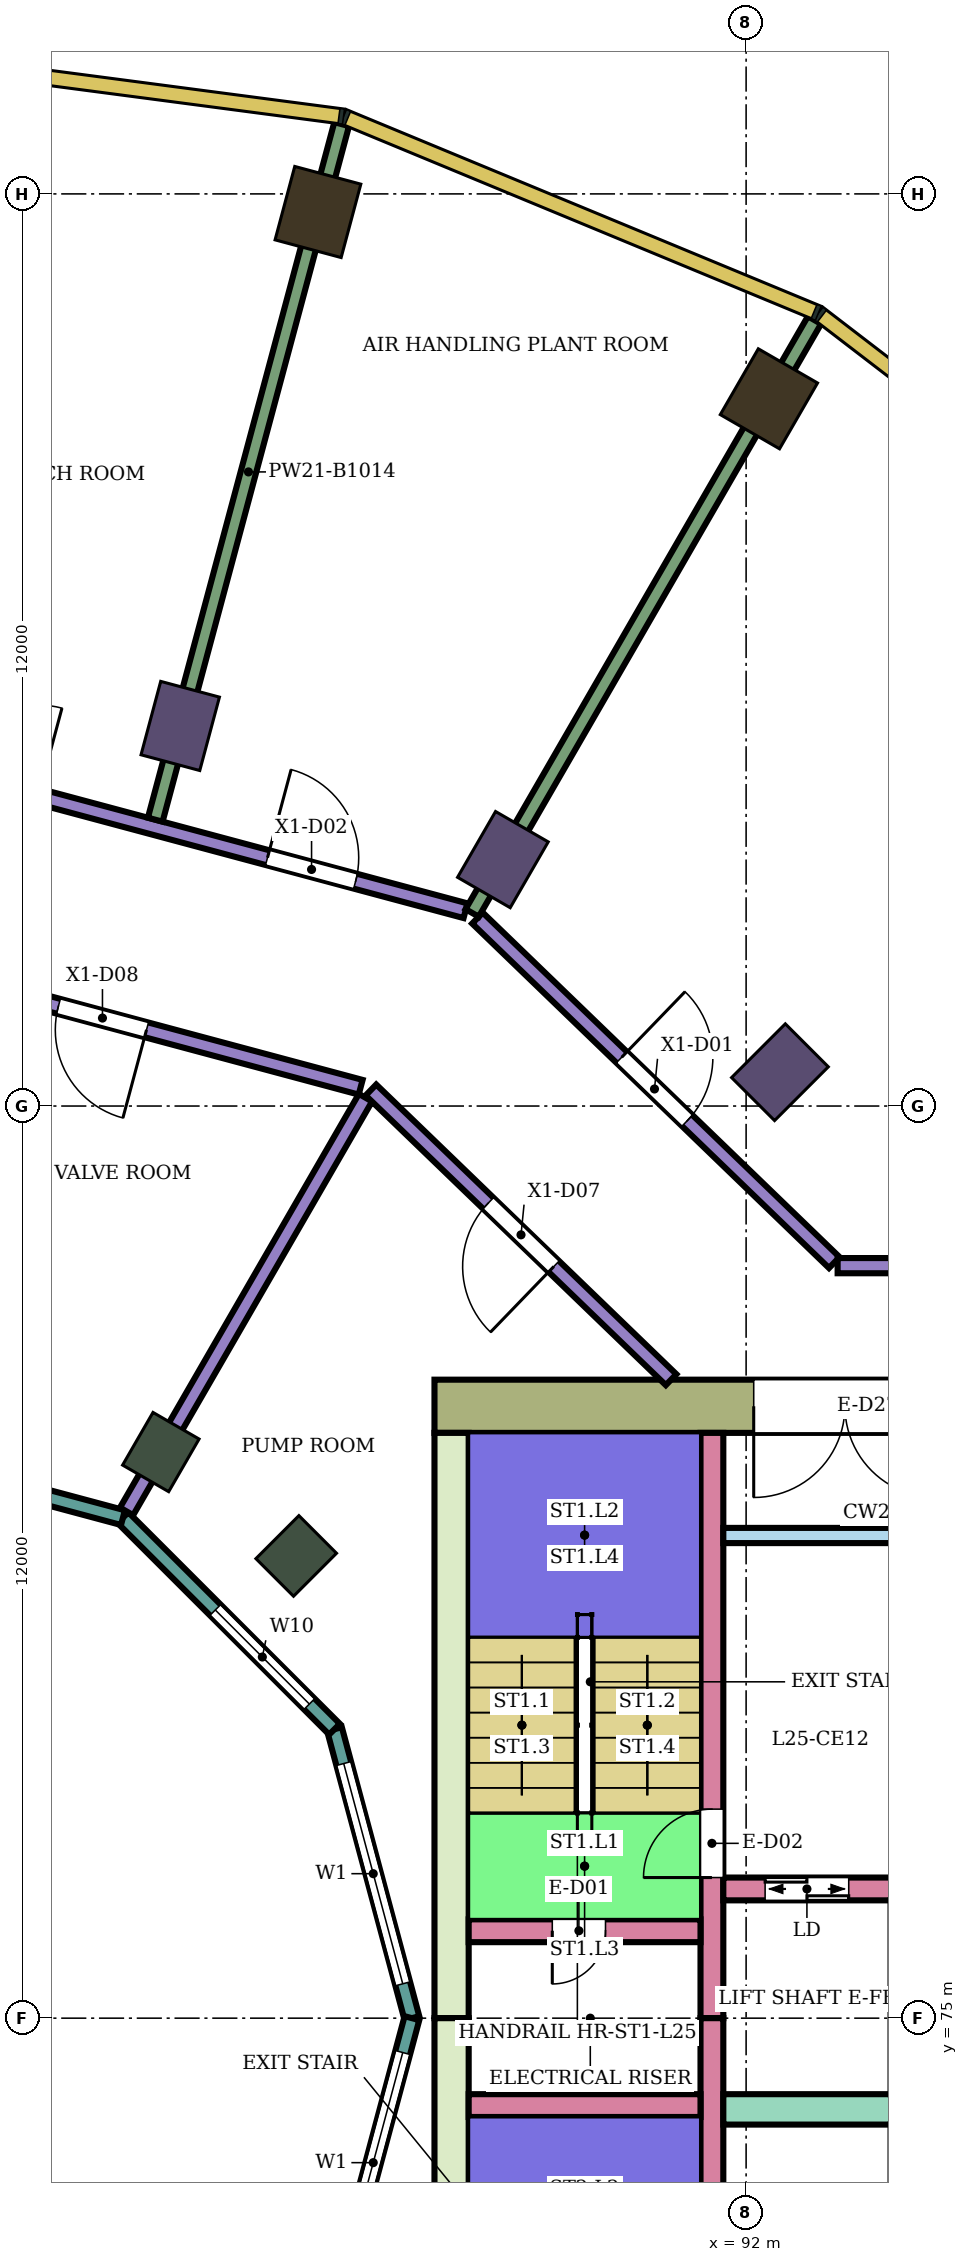
"""IFC4 building model, lengths in metres.
Left out: names, types, materials, properties, quantities, classifications, styles, units other than length and angle.
Written with IfcOpenShell. Run it as: python <this file> out.ifc"""

import sys

from ifc_helpers import new_model, si_unit, direction, frame, frame_2d, origin, origin_2d, place, context, subcontext, project, spatial, rectangle, extrude, element, fill, save


model = new_model("IFC4")
c1 = context("Model", 3, precision=1e-05, world=origin(), true_north=direction((0.0, 1.0)))
c2 = subcontext(c1, "Body", "Model", "MODEL_VIEW")
j1 = project(units=[si_unit("LENGTHUNIT", "METRE"), si_unit("PLANEANGLEUNIT", "RADIAN")], contexts=[c1])
p1 = place(None, origin())
s1 = spatial("IfcSite", under=j1, at=p1, CompositionType="ELEMENT")
p2 = place(p1, origin())
s2 = spatial("IfcBuilding", under=s1, at=p2, CompositionType="ELEMENT")
p3 = place(p2, frame((0.0, 0.0, 109.0)))
s3 = spatial("IfcBuildingStorey", under=s2, at=p3, CompositionType="ELEMENT", Elevation=109.0)
for number, where, z_axis, x_axis in (
    (1, (92.3, 96.304, 0.0), (0.0, 0.0, 1.0), (0.5, 0.866, 0.0)),
    (2, (86.367, 98.762, 0.0), (0.0, 0.0, 1.0), (0.259, 0.966, 0.0)),
):
    element("IfcColumn", number, at=place(p3, frame(where, z_axis=z_axis, x_axis=x_axis)), inside=s3, PredefinedType="COLUMN", context=c2, shape_type="SweptSolid", body=[
        extrude(rectangle(XDim=1.0, YDim=0.9, at=origin_2d()), origin(), (0.0, 0.0, 1.0), 5.6),
    ])
for number, where, z_axis, x_axis in (
    (3, (92.445, 87.445, 0.0), (0.0, 0.0, 1.0), (0.707, 0.707, 0.0)),
    (4, (88.8, 90.242, 0.0), (0.0, 0.0, 1.0), (0.5, 0.866, 0.0)),
    (5, (84.555, 92.0, 0.0), (0.0, 0.0, 1.0), (0.259, 0.966, 0.0)),
):
    element("IfcColumn", number, at=place(p3, frame(where, z_axis=z_axis, x_axis=x_axis)), inside=s3, PredefinedType="COLUMN", context=c2, shape_type="SweptSolid", body=[
        extrude(rectangle(XDim=1.0, YDim=0.8, at=origin_2d()), origin(), (0.0, 0.0, 1.0), 5.6),
    ])
for number, where, z_axis, x_axis in (
    (6, (86.081, 81.081, 0.0), (0.0, 0.0, 1.0), (0.707, 0.707, 0.0)),
    (7, (84.3, 82.448, 0.0), (0.0, 0.0, 1.0), (0.5, 0.866, 0.0)),
):
    element("IfcColumn", number, at=place(p3, frame(where, z_axis=z_axis, x_axis=x_axis)), inside=s3, PredefinedType="COLUMN", context=c2, shape_type="SweptSolid", body=[
        extrude(rectangle(XDim=0.8, YDim=0.7, at=origin_2d()), origin(), (0.0, 0.0, 1.0), 5.6),
    ])
p4 = place(p3, frame((87.9, 83.05, 0.0), z_axis=(0.0, 0.0, 1.0), x_axis=(1.0, 0.0, 0.0)))
e8 = element("IfcWall", 8, at=p4, inside=s3, PredefinedType="SHEAR", context=c2, shape_type="SweptSolid", body=[
    extrude(rectangle(XDim=14.8, YDim=0.7, at=frame_2d((7.4, 0.0))), origin(), (0.0, 0.0, 1.0), 5.28),
])
p5 = place(p4, frame((4.2, 0.0, 0.0)))
e9 = element("IfcOpeningElement", 9, at=p5, cuts=e8, PredefinedType="OPENING", context=c2, shape_type="SweptSolid", body=[
    extrude(rectangle(XDim=2.4, YDim=2.4, at=frame_2d((1.2, 1.2))), frame((0.0, 0.36, 0.0), z_axis=(0.0, -1.0, 0.0), x_axis=(1.0, 0.0, 0.0)), (0.0, 0.0, 1.0), 0.72),
])
for number, where, z_axis, x_axis in (
    (10, (88.125, 75.0, 0.0), (0.0, 0.0, 1.0), (0.0, 1.0, 0.0)),
    (11, (88.125, 67.3, 0.0), (0.0, 0.0, 1.0), (0.0, 1.0, 0.0)),
):
    element("IfcWall", number, at=place(p3, frame(where, z_axis=z_axis, x_axis=x_axis)), inside=s3, PredefinedType="SHEAR", context=c2, shape_type="SweptSolid", body=[
        extrude(rectangle(XDim=7.7, YDim=0.45, at=frame_2d((3.85, 0.0))), origin(), (0.0, 0.0, 1.0), 5.28),
    ])
p6 = place(p3, frame((91.55, 75.0, 0.0), z_axis=(0.0, 0.0, 1.0), x_axis=(0.0, 1.0, 0.0)))
e12 = element("IfcWall", 12, at=p6, inside=s3, PredefinedType="SHEAR", context=c2, shape_type="SweptSolid", body=[
    extrude(rectangle(XDim=7.7, YDim=0.3, at=frame_2d((3.85, 0.0))), origin(), (0.0, 0.0, 1.0), 5.28),
])
p7 = place(p6, frame((1.85, 0.0, 0.0)))
e13 = element("IfcOpeningElement", 13, at=p7, cuts=e12, PredefinedType="OPENING", context=c2, shape_type="SweptSolid", body=[
    extrude(rectangle(XDim=0.9, YDim=2.1, at=frame_2d((0.45, 1.05))), frame((0.0, 0.16, 0.0), z_axis=(0.0, -1.0, 0.0), x_axis=(1.0, 0.0, 0.0)), (0.0, 0.0, 1.0), 0.32),
])
p8 = place(p3, frame((91.55, 67.3, 0.0), z_axis=(0.0, 0.0, 1.0), x_axis=(0.0, 1.0, 0.0)))
e14 = element("IfcWall", 14, at=p8, inside=s3, PredefinedType="SHEAR", context=c2, shape_type="SweptSolid", body=[
    extrude(rectangle(XDim=7.7, YDim=0.3, at=frame_2d((3.85, 0.0))), origin(), (0.0, 0.0, 1.0), 5.28),
])
p9 = place(p8, frame((0.35, 0.0, 0.0)))
e15 = element("IfcOpeningElement", 15, at=p9, cuts=e14, PredefinedType="OPENING", context=c2, shape_type="SweptSolid", body=[
    extrude(rectangle(XDim=0.9, YDim=2.1, at=frame_2d((0.45, 1.05))), frame((0.0, 0.16, 0.0), z_axis=(0.0, -1.0, 0.0), x_axis=(1.0, 0.0, 0.0)), (0.0, 0.0, 1.0), 0.32),
])
p10 = place(p3, frame((88.35, 76.15, 0.0), z_axis=(0.0, 0.0, 1.0), x_axis=(1.0, 0.0, 0.0)))
e16 = element("IfcWall", 16, at=p10, inside=s3, PredefinedType="SHEAR", context=c2, shape_type="SweptSolid", body=[
    extrude(rectangle(XDim=3.05, YDim=0.3, at=frame_2d((1.525, 0.0))), origin(), (0.0, 0.0, 1.0), 5.28),
])
p11 = place(p10, frame((1.1, 0.0, 0.0)))
e17 = element("IfcOpeningElement", 17, at=p11, cuts=e16, PredefinedType="OPENING", context=c2, shape_type="SweptSolid", body=[
    extrude(rectangle(XDim=0.7, YDim=2.0, at=frame_2d((0.35, 1.0))), frame((0.0, 0.16, 0.0), z_axis=(0.0, -1.0, 0.0), x_axis=(1.0, 0.0, 0.0)), (0.0, 0.0, 1.0), 0.32),
])
p12 = place(p3, frame((88.35, 73.85, 0.0), z_axis=(0.0, 0.0, 1.0), x_axis=(1.0, 0.0, 0.0)))
e18 = element("IfcWall", 18, at=p12, inside=s3, PredefinedType="SHEAR", context=c2, shape_type="SweptSolid", body=[
    extrude(rectangle(XDim=3.05, YDim=0.3, at=frame_2d((1.525, 0.0))), origin(), (0.0, 0.0, 1.0), 5.28),
])
p13 = place(p3, frame((91.7, 76.7, 0.0), z_axis=(0.0, 0.0, 1.0), x_axis=(1.0, 0.0, 0.0)))
e19 = element("IfcWall", 19, at=p13, inside=s3, PredefinedType="SHEAR", context=c2, shape_type="SweptSolid", body=[
    extrude(rectangle(XDim=11.0, YDim=0.3, at=frame_2d((5.5, 0.0))), origin(), (0.0, 0.0, 1.0), 5.28),
])
p14 = place(p13, frame((0.55, 0.0, 0.0)))
e20 = element("IfcOpeningElement", 20, at=p14, cuts=e19, PredefinedType="OPENING", context=c2, shape_type="SweptSolid", body=[
    extrude(rectangle(XDim=1.1, YDim=2.1, at=frame_2d((0.55, 1.05))), frame((0.0, 0.16, 0.0), z_axis=(0.0, -1.0, 0.0), x_axis=(1.0, 0.0, 0.0)), (0.0, 0.0, 1.0), 0.32),
])
p15 = place(p13, frame((8.1, 0.0, 0.0)))
e21 = element("IfcOpeningElement", 21, at=p15, cuts=e19, PredefinedType="OPENING", context=c2, shape_type="SweptSolid", body=[
    extrude(rectangle(XDim=1.0, YDim=2.1, at=frame_2d((0.5, 1.05))), frame((0.0, 0.16, 0.0), z_axis=(0.0, -1.0, 0.0), x_axis=(1.0, 0.0, 0.0)), (0.0, 0.0, 1.0), 0.32),
])
p16 = place(p3, frame((91.7, 73.8, 0.0), z_axis=(0.0, 0.0, 1.0), x_axis=(1.0, 0.0, 0.0)))
e22 = element("IfcWall", 22, at=p16, inside=s3, PredefinedType="SHEAR", context=c2, shape_type="SweptSolid", body=[
    extrude(rectangle(XDim=11.0, YDim=0.4, at=frame_2d((5.5, 0.0))), origin(), (0.0, 0.0, 1.0), 5.28),
])
p17 = place(p3, frame((91.7, 81.35, 0.0), z_axis=(0.0, 0.0, 1.0), x_axis=(1.0, 0.0, 0.0)))
e23 = element("IfcWall", 23, at=p17, inside=s3, PredefinedType="SHEAR", context=c2, shape_type="SweptSolid", body=[
    extrude(rectangle(XDim=4.5, YDim=0.2, at=frame_2d((2.25, 0.0))), origin(), (0.0, 0.0, 1.0), 5.28),
])
p18 = place(p3, frame((87.604, 75.0, 0.0), z_axis=(0.0, 0.0, 1.0), x_axis=(-0.258789828301, 0.965933654434, 0.0)))
e24 = element("IfcWall", 24, at=p18, inside=s3, PredefinedType="NOTDEFINED", context=c2, shape_type="SweptSolid", body=[
    extrude(rectangle(XDim=3.936, YDim=0.2, at=frame_2d((1.968, 0.0))), origin(), (0.0, 0.0, 1.0), 5.6),
])
p19 = place(p18, frame((0.468, 0.0, 0.9)))
e25 = element("IfcOpeningElement", 25, at=p19, cuts=e24, PredefinedType="OPENING", context=c2, shape_type="SweptSolid", body=[
    extrude(rectangle(XDim=3.0, YDim=2.3, at=frame_2d((1.5, 1.15))), frame((0.0, 0.11, 0.0), z_axis=(0.0, -1.0, 0.0), x_axis=(1.0, 0.0, 0.0)), (0.0, 0.0, 1.0), 0.22),
])
p20 = place(p3, frame((86.585, 78.802, 0.0), z_axis=(0.0, 0.0, 1.0), x_axis=(-0.707106781187, 0.707106781187, 0.0)))
e26 = element("IfcWall", 26, at=p20, inside=s3, PredefinedType="NOTDEFINED", context=c2, shape_type="SweptSolid", body=[
    extrude(rectangle(XDim=3.936, YDim=0.2, at=frame_2d((1.968, 0.0))), origin(), (0.0, 0.0, 1.0), 5.6),
])
p21 = place(p20, frame((0.468, 0.0, 0.9)))
e27 = element("IfcOpeningElement", 27, at=p21, cuts=e26, PredefinedType="OPENING", context=c2, shape_type="SweptSolid", body=[
    extrude(rectangle(XDim=1.75, YDim=2.3, at=frame_2d((0.875, 1.15))), frame((0.0, 0.11, 0.0), z_axis=(0.0, -1.0, 0.0), x_axis=(1.0, 0.0, 0.0)), (0.0, 0.0, 1.0), 0.22),
])
p22 = place(p3, frame((83.802, 81.585, 0.0), z_axis=(0.0, 0.0, 1.0), x_axis=(-0.965933654434, 0.258789828301, 0.0)))
e28 = element("IfcWall", 28, at=p22, inside=s3, PredefinedType="NOTDEFINED", context=c2, shape_type="SweptSolid", body=[
    extrude(rectangle(XDim=3.936, YDim=0.2, at=frame_2d((1.968, 0.0))), origin(), (0.0, 0.0, 1.0), 5.6),
])
p23 = place(p22, frame((2.118, 0.0, 0.9)))
e29 = element("IfcOpeningElement", 29, at=p23, cuts=e28, PredefinedType="OPENING", context=c2, shape_type="SweptSolid", body=[
    extrude(rectangle(XDim=1.35, YDim=2.3, at=frame_2d((0.675, 1.15))), frame((0.0, 0.11, 0.0), z_axis=(0.0, -1.0, 0.0), x_axis=(1.0, 0.0, 0.0)), (0.0, 0.0, 1.0), 0.22),
])
p24 = place(p3, frame((86.585, 71.198, 0.0), z_axis=(0.0, 0.0, 1.0), x_axis=(0.258789828301, 0.965933654434, 0.0)))
e30 = element("IfcWall", 30, at=p24, inside=s3, PredefinedType="NOTDEFINED", context=c2, shape_type="SweptSolid", body=[
    extrude(rectangle(XDim=3.936, YDim=0.2, at=frame_2d((1.968, 0.0))), origin(), (0.0, 0.0, 1.0), 5.6),
])
p25 = place(p24, frame((0.468, 0.0, 0.9)))
e31 = element("IfcOpeningElement", 31, at=p25, cuts=e30, PredefinedType="OPENING", context=c2, shape_type="SweptSolid", body=[
    extrude(rectangle(XDim=3.0, YDim=2.3, at=frame_2d((1.5, 1.15))), frame((0.0, 0.11, 0.0), z_axis=(0.0, -1.0, 0.0), x_axis=(1.0, 0.0, 0.0)), (0.0, 0.0, 1.0), 0.22),
])
p26 = place(p3, frame((80.0, 89.104, 0.0), z_axis=(0.0, 0.0, 1.0), x_axis=(0.965912194639, -0.258869913757, 0.0)))
e32 = element("IfcWall", 32, at=p26, inside=s3, PredefinedType="PARTITIONING", context=c2, shape_type="SweptSolid", body=[
    extrude(rectangle(XDim=7.173, YDim=0.2, at=frame_2d((3.587, 0.0))), origin(), (0.0, 0.0, 1.0), 5.15),
])
p27 = place(p26, frame((3.057, 0.0, 0.0)))
e33 = element("IfcOpeningElement", 33, at=p27, cuts=e32, PredefinedType="OPENING", context=c2, shape_type="SweptSolid", body=[
    extrude(rectangle(XDim=1.2, YDim=2.4, at=frame_2d((0.6, 1.2))), frame((0.0, 0.11, 0.0), z_axis=(0.0, -1.0, 0.0), x_axis=(1.0, 0.0, 0.0)), (0.0, 0.0, 1.0), 0.22),
])
p28 = place(p3, frame((80.0, 91.796, 0.0), z_axis=(0.0, 0.0, 1.0), x_axis=(0.965917643923, -0.258849580177, 0.0)))
e34 = element("IfcWall", 34, at=p28, inside=s3, PredefinedType="PARTITIONING", context=c2, shape_type="SweptSolid", body=[
    extrude(rectangle(XDim=8.602, YDim=0.2, at=frame_2d((4.301, 0.0))), origin(), (0.0, 0.0, 1.0), 5.15),
])
p29 = place(p28, frame((5.905, 0.0, 0.0)))
e35 = element("IfcOpeningElement", 35, at=p29, cuts=e34, PredefinedType="OPENING", context=c2, shape_type="SweptSolid", body=[
    extrude(rectangle(XDim=1.2, YDim=2.4, at=frame_2d((0.6, 1.2))), frame((0.0, 0.11, 0.0), z_axis=(0.0, -1.0, 0.0), x_axis=(1.0, 0.0, 0.0)), (0.0, 0.0, 1.0), 0.22),
])
p30 = place(p28, frame((1.583, 0.0, 0.0)))
e36 = element("IfcOpeningElement", 36, at=p30, cuts=e34, PredefinedType="OPENING", context=c2, shape_type="SweptSolid", body=[
    extrude(rectangle(XDim=1.2, YDim=2.4, at=frame_2d((0.6, 1.2))), frame((0.0, 0.11, 0.0), z_axis=(0.0, -1.0, 0.0), x_axis=(1.0, 0.0, 0.0)), (0.0, 0.0, 1.0), 0.22),
])
p31 = place(p3, frame((83.849, 81.667, 0.0), z_axis=(0.0, 0.0, 1.0), x_axis=(0.500074377092, 0.865982457891, 0.0)))
e37 = element("IfcWall", 37, at=p31, inside=s3, PredefinedType="PARTITIONING", context=c2, shape_type="SweptSolid", body=[
    extrude(rectangle(XDim=6.285, YDim=0.2, at=frame_2d((3.143, 0.0))), origin(), (0.0, 0.0, 1.0), 5.15),
])
p32 = place(p3, frame((84.226, 90.767, 0.0), z_axis=(0.0, 0.0, 1.0), x_axis=(0.258915131717, 0.965900074836, 0.0)))
e38 = element("IfcWall", 38, at=p32, inside=s3, PredefinedType="PARTITIONING", context=c2, shape_type="SweptSolid", body=[
    extrude(rectangle(XDim=9.474, YDim=0.2, at=frame_2d((4.737, 0.0))), origin(), (0.0, 0.0, 1.0), 4.586),
])
p33 = place(p3, frame((87.064, 87.211, 0.0), z_axis=(0.0, 0.0, 1.0), x_axis=(0.719562412484, -0.694427774891, 0.0)))
e39 = element("IfcWall", 39, at=p33, inside=s3, PredefinedType="PARTITIONING", context=c2, shape_type="SweptSolid", body=[
    extrude(rectangle(XDim=5.488, YDim=0.2, at=frame_2d((2.744, 0.0))), origin(), (0.0, 0.0, 1.0), 5.15),
])
p34 = place(p33, frame((2.144, 0.0, 0.0)))
e40 = element("IfcOpeningElement", 40, at=p34, cuts=e39, PredefinedType="OPENING", context=c2, shape_type="SweptSolid", body=[
    extrude(rectangle(XDim=1.2, YDim=2.4, at=frame_2d((0.6, 1.2))), frame((0.0, 0.11, 0.0), z_axis=(0.0, -1.0, 0.0), x_axis=(1.0, 0.0, 0.0)), (0.0, 0.0, 1.0), 0.22),
])
p35 = place(p3, frame((88.466, 89.473, 0.0), z_axis=(0.0, 0.0, 1.0), x_axis=(0.719419511771, -0.694575817376, 0.0)))
e41 = element("IfcWall", 41, at=p35, inside=s3, PredefinedType="PARTITIONING", context=c2, shape_type="SweptSolid", body=[
    extrude(rectangle(XDim=6.525, YDim=0.2, at=frame_2d((3.263, 0.0))), origin(), (0.0, 0.0, 1.0), 5.15),
])
p36 = place(p35, frame((2.637, 0.0, 0.0)))
e42 = element("IfcOpeningElement", 42, at=p36, cuts=e41, PredefinedType="OPENING", context=c2, shape_type="SweptSolid", body=[
    extrude(rectangle(XDim=1.2, YDim=2.4, at=frame_2d((0.6, 1.2))), frame((0.0, 0.11, 0.0), z_axis=(0.0, -1.0, 0.0), x_axis=(1.0, 0.0, 0.0)), (0.0, 0.0, 1.0), 0.22),
])
p37 = place(p3, frame((88.396, 89.54, 0.0), z_axis=(0.0, 0.0, 1.0), x_axis=(0.500080676104, 0.865978820404, 0.0)))
e43 = element("IfcWall", 43, at=p37, inside=s3, PredefinedType="PARTITIONING", context=c2, shape_type="SweptSolid", body=[
    extrude(rectangle(XDim=9.006, YDim=0.2, at=frame_2d((4.503, 0.0))), origin(), (0.0, 0.0, 1.0), 4.586),
])
p38 = place(p3, frame((93.204, 84.9, 0.0), z_axis=(0.0, 0.0, 1.0), x_axis=(1.0, 0.0, 0.0)))
e44 = element("IfcWall", 44, at=p38, inside=s3, PredefinedType="PARTITIONING", context=c2, shape_type="SweptSolid", body=[
    extrude(rectangle(XDim=1.496, YDim=0.2, at=frame_2d((0.748, 0.0))), origin(), (0.0, 0.0, 1.0), 5.15),
])
p39 = place(p19, origin())
e45 = element("IfcWindow", 45, at=p39, inside=s3, PartitioningType="SINGLE_PANEL", PredefinedType="WINDOW", context=c2, shape_type="SweptSolid", body=[
    extrude(rectangle(XDim=3.0, YDim=2.3, at=frame_2d((1.5, 1.15))), frame((0.0, 0.03, 0.0), z_axis=(0.0, -1.0, 0.0), x_axis=(1.0, 0.0, 0.0)), (0.0, 0.0, 1.0), 0.06),
])
fill(e25, e45)
p40 = place(p21, origin())
e46 = element("IfcWindow", 46, at=p40, inside=s3, PartitioningType="SINGLE_PANEL", PredefinedType="WINDOW", context=c2, shape_type="SweptSolid", body=[
    extrude(rectangle(XDim=1.75, YDim=2.3, at=frame_2d((0.875, 1.15))), frame((0.0, 0.03, 0.0), z_axis=(0.0, -1.0, 0.0), x_axis=(1.0, 0.0, 0.0)), (0.0, 0.0, 1.0), 0.06),
])
fill(e27, e46)
p41 = place(p25, origin())
e47 = element("IfcWindow", 47, at=p41, inside=s3, PartitioningType="SINGLE_PANEL", PredefinedType="WINDOW", context=c2, shape_type="SweptSolid", body=[
    extrude(rectangle(XDim=3.0, YDim=2.3, at=frame_2d((1.5, 1.15))), frame((0.0, 0.03, 0.0), z_axis=(0.0, -1.0, 0.0), x_axis=(1.0, 0.0, 0.0)), (0.0, 0.0, 1.0), 0.06),
])
fill(e31, e47)
p42 = place(p36, origin())
e48 = element("IfcDoor", 48, at=p42, inside=s3, OperationType="SINGLE_SWING_LEFT", PredefinedType="DOOR", context=c2, shape_type="SweptSolid", body=[
    extrude(rectangle(XDim=1.2, YDim=2.4, at=frame_2d((0.6, 1.2))), frame((0.0, 0.025, 0.0), z_axis=(0.0, -1.0, 0.0), x_axis=(1.0, 0.0, 0.0)), (0.0, 0.0, 1.0), 0.05),
])
fill(e42, e48)
p43 = place(p29, origin())
e49 = element("IfcDoor", 49, at=p43, inside=s3, OperationType="SINGLE_SWING_LEFT", PredefinedType="DOOR", context=c2, shape_type="SweptSolid", body=[
    extrude(rectangle(XDim=1.2, YDim=2.4, at=frame_2d((0.6, 1.2))), frame((0.0, 0.025, 0.0), z_axis=(0.0, -1.0, 0.0), x_axis=(1.0, 0.0, 0.0)), (0.0, 0.0, 1.0), 0.05),
])
fill(e35, e49)
p44 = place(p34, frame((1.2, 0.0, 0.0), z_axis=(0.0, 0.0, 1.0), x_axis=(-1.0, 0.0, 0.0)))
e50 = element("IfcDoor", 50, at=p44, inside=s3, OperationType="SINGLE_SWING_LEFT", PredefinedType="DOOR", context=c2, shape_type="SweptSolid", body=[
    extrude(rectangle(XDim=1.2, YDim=2.4, at=frame_2d((0.6, 1.2))), frame((0.0, 0.025, 0.0), z_axis=(0.0, -1.0, 0.0), x_axis=(1.0, 0.0, 0.0)), (0.0, 0.0, 1.0), 0.05),
])
fill(e40, e50)
p45 = place(p27, frame((1.2, 0.0, 0.0), z_axis=(0.0, 0.0, 1.0), x_axis=(-1.0, 0.0, 0.0)))
e51 = element("IfcDoor", 51, at=p45, inside=s3, OperationType="SINGLE_SWING_LEFT", PredefinedType="DOOR", context=c2, shape_type="SweptSolid", body=[
    extrude(rectangle(XDim=1.2, YDim=2.4, at=frame_2d((0.6, 1.2))), frame((0.0, 0.025, 0.0), z_axis=(0.0, -1.0, 0.0), x_axis=(1.0, 0.0, 0.0)), (0.0, 0.0, 1.0), 0.05),
])
fill(e33, e51)
p46 = place(p11, frame((0.7, 0.0, 0.0), z_axis=(0.0, 0.0, 1.0), x_axis=(-1.0, 0.0, 0.0)))
e52 = element("IfcDoor", 52, at=p46, inside=s3, OperationType="SINGLE_SWING_RIGHT", PredefinedType="DOOR", context=c2, shape_type="SweptSolid", body=[
    extrude(rectangle(XDim=0.7, YDim=2.0, at=frame_2d((0.35, 1.0))), frame((0.0, 0.025, 0.0), z_axis=(0.0, -1.0, 0.0), x_axis=(1.0, 0.0, 0.0)), (0.0, 0.0, 1.0), 0.05),
])
fill(e17, e52)
p47 = place(p7, origin())
e53 = element("IfcDoor", 53, at=p47, inside=s3, OperationType="SINGLE_SWING_LEFT", PredefinedType="DOOR", context=c2, shape_type="SweptSolid", body=[
    extrude(rectangle(XDim=0.9, YDim=2.1, at=frame_2d((0.45, 1.05))), frame((0.0, 0.025, 0.0), z_axis=(0.0, -1.0, 0.0), x_axis=(1.0, 0.0, 0.0)), (0.0, 0.0, 1.0), 0.05),
])
fill(e13, e53)
p48 = place(p14, origin())
e54 = element("IfcDoor", 54, at=p48, inside=s3, OperationType="DOUBLE_DOOR_SLIDING", PredefinedType="DOOR", context=c2, shape_type="SweptSolid", body=[
    extrude(rectangle(XDim=1.1, YDim=2.1, at=frame_2d((0.55, 1.05))), frame((0.0, 0.025, 0.0), z_axis=(0.0, -1.0, 0.0), x_axis=(1.0, 0.0, 0.0)), (0.0, 0.0, 1.0), 0.05),
])
fill(e20, e54)
p49 = place(p5, frame((2.4, 0.0, 0.0), z_axis=(0.0, 0.0, 1.0), x_axis=(-1.0, 0.0, 0.0)))
e55 = element("IfcDoor", 55, at=p49, inside=s3, OperationType="DOUBLE_DOOR_SINGLE_SWING", PredefinedType="DOOR", context=c2, shape_type="SweptSolid", body=[
    extrude(rectangle(XDim=2.4, YDim=2.4, at=frame_2d((1.2, 1.2))), frame((0.0, 0.025, 0.0), z_axis=(0.0, -1.0, 0.0), x_axis=(1.0, 0.0, 0.0)), (0.0, 0.0, 1.0), 0.05),
])
fill(e9, e55)
save(model, sys.argv[1])
